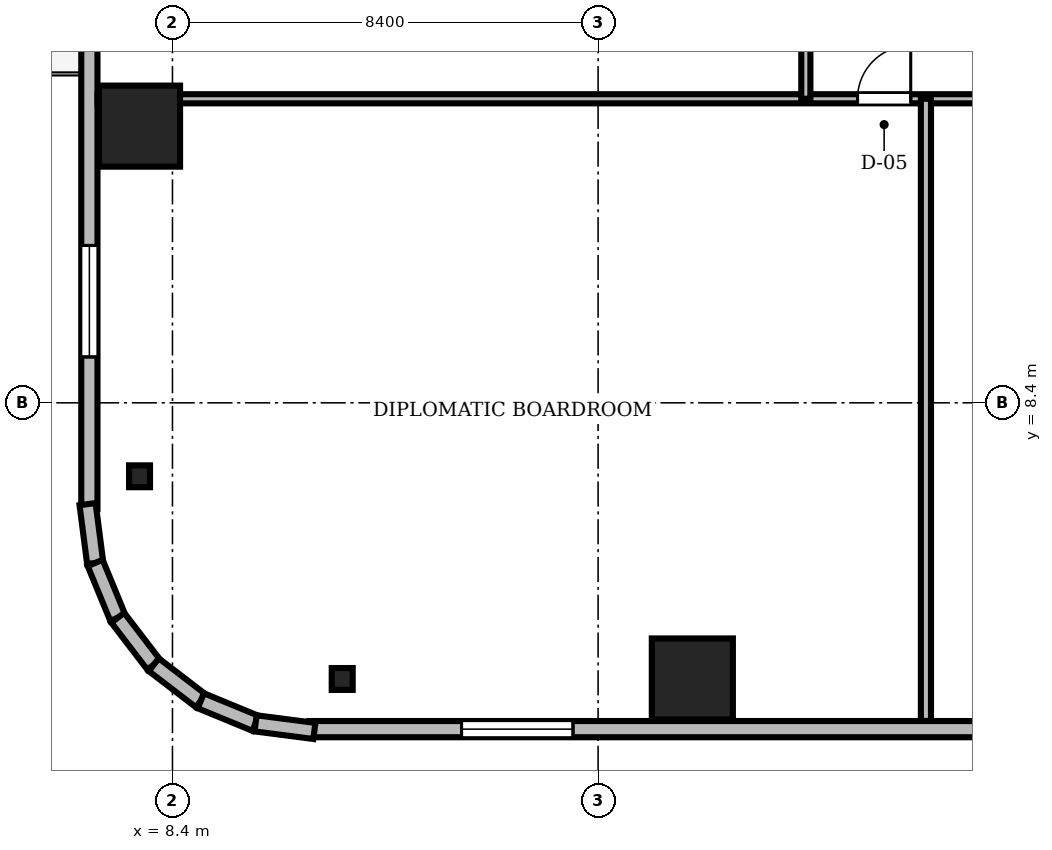
"""IFC4 building model, lengths in metres.
Left out: names, types, materials, properties, quantities, classifications, styles, units other than length and angle.
Written with IfcOpenShell. Run it as: python <this file> out.ifc"""

import sys

from ifc_helpers import new_model, si_unit, direction, frame, frame_2d, origin, origin_2d, place, context, subcontext, project, spatial, rectangle, i_section, extrude, source, transform, mapped, element, fill, save


model = new_model("IFC4")
c1 = context("Model", 3, precision=1e-05, world=origin(), true_north=direction((0.0, 1.0)))
c2 = subcontext(c1, "Body", "Model", "MODEL_VIEW")
j1 = project(units=[si_unit("LENGTHUNIT", "METRE"), si_unit("PLANEANGLEUNIT", "RADIAN")], contexts=[c1])
p1 = place(None, origin())
s1 = spatial("IfcSite", under=j1, at=p1, CompositionType="ELEMENT")
p2 = place(p1, origin())
s2 = spatial("IfcBuilding", under=s1, at=p2, CompositionType="ELEMENT")
p3 = place(p2, frame((0.0, 0.0, 137.2)))
s3 = spatial("IfcBuildingStorey", under=s2, at=p3, CompositionType="ELEMENT", Elevation=137.2)
m1 = source(origin(), c2, "Body", "SweptSolid", [
    extrude(rectangle(XDim=1.6, YDim=1.6, at=origin_2d()), origin(), (0.0, 0.0, 1.0), 3.46),
])
for number, where, z_axis, x_axis in (
    (1, (18.66, 2.95, 0.0), (0.0, 0.0, 1.0), (1.0, 0.0, 0.0)),
    (2, (7.75, 13.86, 0.0), (0.0, 0.0, 1.0), (1.0, 0.0, 0.0)),
):
    element("IfcColumn", number, at=place(p3, frame(where, z_axis=z_axis, x_axis=x_axis)), inside=s3, PredefinedType="COLUMN", context=c2, shape_type="MappedRepresentation", body=[
        mapped(m1, transform((0.0, 0.0, 0.0), scale=1.0)),
    ])
m2 = source(origin(), c2, "Body", "SweptSolid", [
    extrude(i_section(OverallWidth=0.414, OverallDepth=0.432, WebThickness=0.026, FlangeThickness=0.04, FilletRadius=0.015, at=origin_2d()), origin(), (0.0, 0.0, 1.0), 3.46),
])
for number, where, z_axis, x_axis in (
    (3, (11.75, 2.95, 0.0), (0.0, 0.0, 1.0), (1.0, 0.0, 0.0)),
    (4, (7.75, 6.95, 0.0), (0.0, 0.0, 1.0), (1.0, 0.0, 0.0)),
):
    element("IfcColumn", number, at=place(p3, frame(where, z_axis=z_axis, x_axis=x_axis)), inside=s3, PredefinedType="COLUMN", context=c2, shape_type="MappedRepresentation", body=[
        mapped(m2, transform((0.0, 0.0, 0.0), scale=1.0)),
    ])
m3 = source(origin(), c2, "Body", "SweptSolid", [
    extrude(rectangle(XDim=15.6, YDim=0.32, at=frame_2d((7.8, 0.0))), origin(), (0.0, 0.0, 1.0), 3.46),
])
p4 = place(p3, frame((11.1, 1.96, 0.0), z_axis=(0.0, 0.0, 1.0), x_axis=(1.0, 0.0, 0.0)))
e5 = element("IfcWall", 5, at=p4, inside=s3, PredefinedType="SOLIDWALL", context=c2, shape_type="MappedRepresentation", body=[
    mapped(m3, transform((0.0, 0.0, 0.0), scale=1.0)),
])
m4 = source(origin(), c2, "Body", "SweptSolid", [
    extrude(rectangle(XDim=2.2, YDim=2.4, at=frame_2d((1.1, 1.2))), frame((0.0, 0.17, 0.0), z_axis=(0.0, -1.0, 0.0), x_axis=(1.0, 0.0, 0.0)), (0.0, 0.0, 1.0), 0.34),
])
p5 = place(p4, frame((3.005, 0.0, 0.72)))
e6 = element("IfcOpeningElement", 6, at=p5, cuts=e5, PredefinedType="OPENING", context=c2, shape_type="MappedRepresentation", body=[
    mapped(m4, transform((0.0, 0.0, 0.0), scale=1.0)),
])
p6 = place(p3, frame((6.76, 21.9, 0.0), z_axis=(0.0, 0.0, 1.0), x_axis=(0.0, -1.0, 0.0)))
e7 = element("IfcWall", 7, at=p6, inside=s3, PredefinedType="SOLIDWALL", context=c2, shape_type="MappedRepresentation", body=[
    mapped(m3, transform((0.0, 0.0, 0.0), scale=1.0)),
])
m5 = source(origin(), c2, "Body", "SweptSolid", [
    extrude(rectangle(XDim=1.4, YDim=2.3, at=frame_2d((0.7, 1.15))), frame((0.0, 0.17, 0.0), z_axis=(0.0, -1.0, 0.0), x_axis=(1.0, 0.0, 0.0)), (0.0, 0.0, 1.0), 0.34),
])
p7 = place(p6, frame((4.59, 0.0, 0.0)))
e8 = element("IfcOpeningElement", 8, at=p7, cuts=e7, PredefinedType="OPENING", context=c2, shape_type="MappedRepresentation", body=[
    mapped(m5, transform((0.0, 0.0, 0.0), scale=1.0)),
])
p8 = place(p6, frame((10.395, 0.0, 0.72)))
e9 = element("IfcOpeningElement", 9, at=p8, cuts=e7, PredefinedType="OPENING", context=c2, shape_type="MappedRepresentation", body=[
    mapped(m4, transform((0.0, 0.0, 0.0), scale=1.0)),
])
m6 = source(origin(), c2, "Body", "SweptSolid", [
    extrude(rectangle(XDim=1.171, YDim=0.32, at=frame_2d((0.585, 0.0))), origin(), (0.0, 0.0, 1.0), 3.46),
])
p9 = place(p3, frame((6.724, 6.401, 0.0), z_axis=(0.0, 0.0, 1.0), x_axis=(0.128269133229, -0.991739395941, 0.0)))
e10 = element("IfcWall", 10, at=p9, inside=s3, PredefinedType="SOLIDWALL", context=c2, shape_type="MappedRepresentation", body=[
    mapped(m6, transform((0.0, 0.0, 0.0), scale=1.0)),
])
m7 = source(origin(), c2, "Body", "SweptSolid", [
    extrude(rectangle(XDim=1.169, YDim=0.32, at=frame_2d((0.584, 0.0))), origin(), (0.0, 0.0, 1.0), 3.46),
])
for number, where, z_axis, x_axis in (
    (11, (6.875, 5.24, 0.0), (0.0, 0.0, 1.0), (0.381, -0.925, 0.0)),
    (12, (7.32, 4.159, 0.0), (0.0, 0.0, 1.0), (0.608, -0.794, 0.0)),
):
    element("IfcWall", number, at=place(p3, frame(where, z_axis=z_axis, x_axis=x_axis)), inside=s3, PredefinedType="SOLIDWALL", context=c2, shape_type="MappedRepresentation", body=[
        mapped(m7, transform((0.0, 0.0, 0.0), scale=1.0)),
    ])
m8 = source(origin(), c2, "Body", "SweptSolid", [
    extrude(rectangle(XDim=1.169, YDim=0.32, at=frame_2d((0.584, 0.0))), origin(), (0.0, 0.0, 1.0), 3.46),
])
p10 = place(p3, frame((8.031, 3.231, 0.0), z_axis=(0.0, 0.0, 1.0), x_axis=(0.793663520347, -0.608356981114, 0.0)))
e13 = element("IfcWall", 13, at=p10, inside=s3, PredefinedType="SOLIDWALL", context=c2, shape_type="MappedRepresentation", body=[
    mapped(m8, transform((0.0, 0.0, 0.0), scale=1.0)),
])
m9 = source(origin(), c2, "Body", "SweptSolid", [
    extrude(rectangle(XDim=1.169, YDim=0.32, at=frame_2d((0.585, 0.0))), origin(), (0.0, 0.0, 1.0), 3.46),
])
p11 = place(p3, frame((8.959, 2.52, 0.0), z_axis=(0.0, 0.0, 1.0), x_axis=(0.924479075121, -0.381232789334, 0.0)))
e14 = element("IfcWall", 14, at=p11, inside=s3, PredefinedType="SOLIDWALL", context=c2, shape_type="MappedRepresentation", body=[
    mapped(m9, transform((0.0, 0.0, 0.0), scale=1.0)),
])
m10 = source(origin(), c2, "Body", "SweptSolid", [
    extrude(rectangle(XDim=1.17, YDim=0.32, at=frame_2d((0.585, 0.0))), origin(), (0.0, 0.0, 1.0), 3.46),
])
p12 = place(p3, frame((10.04, 2.074, 0.0), z_axis=(0.0, 0.0, 1.0), x_axis=(0.991762485493, -0.128090485085, 0.0)))
e15 = element("IfcWall", 15, at=p12, inside=s3, PredefinedType="SOLIDWALL", context=c2, shape_type="MappedRepresentation", body=[
    mapped(m10, transform((0.0, 0.0, 0.0), scale=1.0)),
])
m11 = source(origin(), c2, "Body", "SweptSolid", [
    extrude(rectangle(XDim=46.156, YDim=0.18, at=frame_2d((23.078, 0.0))), origin(), (0.0, 0.0, 1.0), 2.702),
])
p13 = place(p3, frame((6.922, 14.4, 0.0), z_axis=(0.0, 0.0, 1.0), x_axis=(1.0, 0.0, 0.0)))
e16 = element("IfcWall", 16, at=p13, inside=s3, PredefinedType="PARTITIONING", context=c2, shape_type="MappedRepresentation", body=[
    mapped(m11, transform((0.0, 0.0, 0.0), scale=1.0)),
])
m12 = source(origin(), c2, "Body", "SweptSolid", [
    extrude(rectangle(XDim=1.05, YDim=2.2, at=frame_2d((0.525, 1.1))), frame((0.0, 0.1, 0.0), z_axis=(0.0, -1.0, 0.0), x_axis=(1.0, 0.0, 0.0)), (0.0, 0.0, 1.0), 0.2),
])
p14 = place(p13, frame((14.998, 0.0, 0.0)))
e17 = element("IfcOpeningElement", 17, at=p14, cuts=e16, PredefinedType="OPENING", context=c2, shape_type="MappedRepresentation", body=[
    mapped(m12, transform((0.0, 0.0, 0.0), scale=1.0)),
])
p15 = place(p13, frame((17.553, 0.0, 0.0)))
e18 = element("IfcOpeningElement", 18, at=p15, cuts=e16, PredefinedType="OPENING", context=c2, shape_type="MappedRepresentation", body=[
    mapped(m12, transform((0.0, 0.0, 0.0), scale=1.0)),
])
p16 = place(p13, frame((21.003, 0.0, 0.0)))
e19 = element("IfcOpeningElement", 19, at=p16, cuts=e16, PredefinedType="OPENING", context=c2, shape_type="MappedRepresentation", body=[
    mapped(m12, transform((0.0, 0.0, 0.0), scale=1.0)),
])
p17 = place(p13, frame((24.532, 0.0, 0.0)))
e20 = element("IfcOpeningElement", 20, at=p17, cuts=e16, PredefinedType="OPENING", context=c2, shape_type="MappedRepresentation", body=[
    mapped(m12, transform((0.0, 0.0, 0.0), scale=1.0)),
])
p18 = place(p13, frame((29.342, 0.0, 0.0)))
e21 = element("IfcOpeningElement", 21, at=p18, cuts=e16, PredefinedType="OPENING", context=c2, shape_type="MappedRepresentation", body=[
    mapped(m12, transform((0.0, 0.0, 0.0), scale=1.0)),
])
p19 = place(p13, frame((34.073, 0.0, 0.0)))
e22 = element("IfcOpeningElement", 22, at=p19, cuts=e16, PredefinedType="OPENING", context=c2, shape_type="MappedRepresentation", body=[
    mapped(m12, transform((0.0, 0.0, 0.0), scale=1.0)),
])
p20 = place(p13, frame((37.822, 0.0, 0.0)))
e23 = element("IfcOpeningElement", 23, at=p20, cuts=e16, PredefinedType="OPENING", context=c2, shape_type="MappedRepresentation", body=[
    mapped(m12, transform((0.0, 0.0, 0.0), scale=1.0)),
])
p21 = place(p13, frame((41.828, 0.0, 0.0)))
e24 = element("IfcOpeningElement", 24, at=p21, cuts=e16, PredefinedType="OPENING", context=c2, shape_type="MappedRepresentation", body=[
    mapped(m12, transform((0.0, 0.0, 0.0), scale=1.0)),
])
m13 = source(origin(), c2, "Body", "SweptSolid", [
    extrude(rectangle(XDim=14.15, YDim=0.18, at=frame_2d((7.075, 0.0))), origin(), (0.0, 0.0, 1.0), 2.852),
])
p22 = place(p3, frame((20.9, 14.4, 0.0), z_axis=(0.0, 0.0, 1.0), x_axis=(0.0, 1.0, 0.0)))
e25 = element("IfcWall", 25, at=p22, inside=s3, PredefinedType="PARTITIONING", context=c2, shape_type="MappedRepresentation", body=[
    mapped(m13, transform((0.0, 0.0, 0.0), scale=1.0)),
])
p23 = place(p22, frame((1.813, 0.0, 0.0)))
e26 = element("IfcOpeningElement", 26, at=p23, cuts=e25, PredefinedType="OPENING", context=c2, shape_type="MappedRepresentation", body=[
    mapped(m12, transform((0.0, 0.0, 0.0), scale=1.0)),
])
m14 = source(origin(), c2, "Body", "SweptSolid", [
    extrude(rectangle(XDim=0.95, YDim=2.15, at=frame_2d((0.475, 1.075))), frame((0.0, 0.1, 0.0), z_axis=(0.0, -1.0, 0.0), x_axis=(1.0, 0.0, 0.0)), (0.0, 0.0, 1.0), 0.2),
])
p24 = place(p22, frame((7.705, 0.0, 0.0)))
e27 = element("IfcOpeningElement", 27, at=p24, cuts=e25, PredefinedType="OPENING", context=c2, shape_type="MappedRepresentation", body=[
    mapped(m14, transform((0.0, 0.0, 0.0), scale=1.0)),
])
p25 = place(p22, frame((11.146, 0.0, 0.0)))
e28 = element("IfcOpeningElement", 28, at=p25, cuts=e25, PredefinedType="OPENING", context=c2, shape_type="MappedRepresentation", body=[
    mapped(m12, transform((0.0, 0.0, 0.0), scale=1.0)),
])
m15 = source(origin(), c2, "Body", "SweptSolid", [
    extrude(rectangle(XDim=12.278, YDim=0.2, at=frame_2d((6.139, 0.0))), origin(), (0.0, 0.0, 1.0), 2.702),
])
p26 = place(p3, frame((23.27, 2.122, 0.0), z_axis=(0.0, 0.0, 1.0), x_axis=(0.0, 1.0, 0.0)))
e29 = element("IfcWall", 29, at=p26, inside=s3, PredefinedType="PARTITIONING", context=c2, shape_type="MappedRepresentation", body=[
    mapped(m15, transform((0.0, 0.0, 0.0), scale=1.0)),
])
m16 = source(origin(), c2, "Body", "SweptSolid", [
    extrude(rectangle(XDim=2.2, YDim=2.4, at=frame_2d((1.1, 1.2))), frame((0.0, 0.03, 0.0), z_axis=(0.0, -1.0, 0.0), x_axis=(1.0, 0.0, 0.0)), (0.0, 0.0, 1.0), 0.06),
])
p27 = place(p5, origin())
e30 = element("IfcWindow", 30, at=p27, inside=s3, PartitioningType="SINGLE_PANEL", PredefinedType="WINDOW", context=c2, shape_type="MappedRepresentation", body=[
    mapped(m16, transform((0.0, 0.0, 0.0), scale=1.0)),
])
fill(e6, e30)
p28 = place(p8, origin())
e31 = element("IfcWindow", 31, at=p28, inside=s3, PartitioningType="SINGLE_PANEL", PredefinedType="WINDOW", context=c2, shape_type="MappedRepresentation", body=[
    mapped(m16, transform((0.0, 0.0, 0.0), scale=1.0)),
])
fill(e9, e31)
m17 = source(origin(), c2, "Body", "SweptSolid", [
    extrude(rectangle(XDim=1.05, YDim=2.2, at=frame_2d((0.525, 1.1))), frame((0.0, 0.025, 0.0), z_axis=(0.0, -1.0, 0.0), x_axis=(1.0, 0.0, 0.0)), (0.0, 0.0, 1.0), 0.05),
])
p29 = place(p14, origin())
e32 = element("IfcDoor", 32, at=p29, inside=s3, OperationType="SINGLE_SWING_RIGHT", PredefinedType="DOOR", context=c2, shape_type="MappedRepresentation", body=[
    mapped(m17, transform((0.0, 0.0, 0.0), scale=1.0)),
])
fill(e17, e32)
save(model, sys.argv[1])
